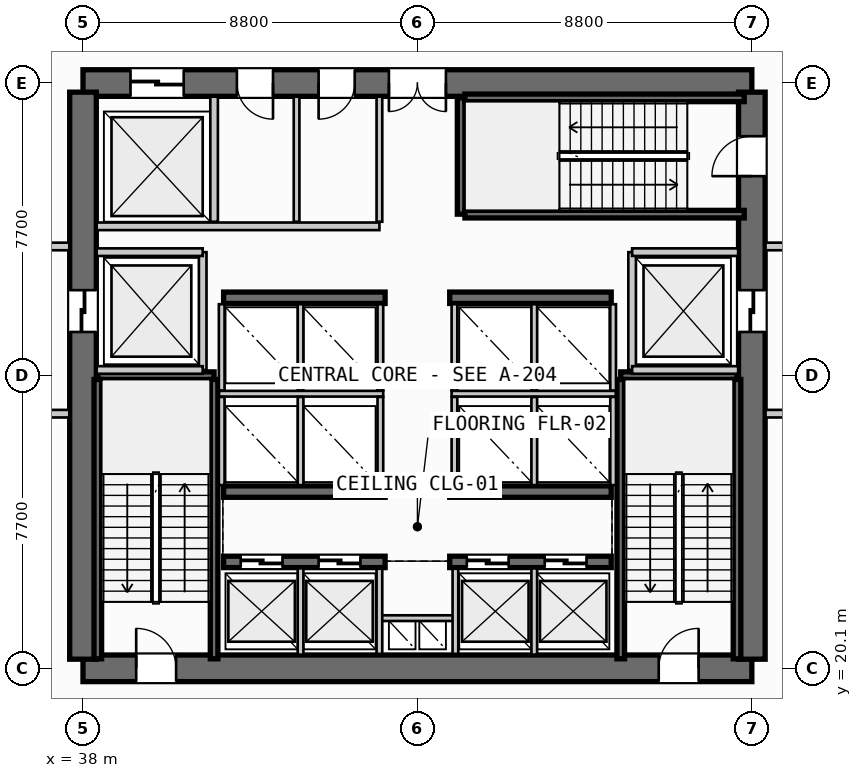
"""IFC4 building model, lengths in metres.
Left out: names, types, materials, properties, quantities, classifications, styles, units other than length and angle.
Written with IfcOpenShell. Run it as: python <this file> out.ifc"""

import sys

from ifc_helpers import new_model, si_unit, direction, frame, frame_2d, origin, place, context, subcontext, project, spatial, rectangle, extrude, source, transform, mapped, element, fill, save


model = new_model("IFC4")
c1 = context("Model", 3, precision=1e-05, world=origin(), true_north=direction((0.0, 1.0)))
c2 = subcontext(c1, "Body", "Model", "MODEL_VIEW")
j1 = project(units=[si_unit("LENGTHUNIT", "METRE"), si_unit("PLANEANGLEUNIT", "RADIAN")], contexts=[c1])
p1 = place(None, origin())
s1 = spatial("IfcSite", under=j1, at=p1, CompositionType="ELEMENT")
p2 = place(p1, origin())
s2 = spatial("IfcBuilding", under=s1, at=p2, CompositionType="ELEMENT")
p3 = place(p2, frame((0.0, 0.0, 19.6)))
s3 = spatial("IfcBuildingStorey", under=s2, at=p3, CompositionType="ELEMENT", Elevation=19.6)
p4 = place(p3, frame((38.0, 20.1, 0.0), z_axis=(0.0, 0.0, 1.0), x_axis=(1.0, 0.0, 0.0)))
e1 = element("IfcWall", 1, at=p4, inside=s3, PredefinedType="SHEAR", context=c2, shape_type="SweptSolid", body=[
    extrude(rectangle(XDim=17.6, YDim=0.7, at=frame_2d((8.8, 0.0))), origin(), (0.0, 0.0, 1.0), 4.08),
])
p5 = place(p4, frame((1.4, 0.0, 0.0)))
e2 = element("IfcOpeningElement", 2, at=p5, cuts=e1, PredefinedType="OPENING", context=c2, shape_type="SweptSolid", body=[
    extrude(rectangle(XDim=1.05, YDim=2.15, at=frame_2d((0.525, 1.075))), frame((0.0, 0.36, 0.0), z_axis=(0.0, -1.0, 0.0), x_axis=(1.0, 0.0, 0.0)), (0.0, 0.0, 1.0), 0.72),
])
p6 = place(p4, frame((15.15, 0.0, 0.0)))
e3 = element("IfcOpeningElement", 3, at=p6, cuts=e1, PredefinedType="OPENING", context=c2, shape_type="SweptSolid", body=[
    extrude(rectangle(XDim=1.05, YDim=2.15, at=frame_2d((0.525, 1.075))), frame((0.0, 0.36, 0.0), z_axis=(0.0, -1.0, 0.0), x_axis=(1.0, 0.0, 0.0)), (0.0, 0.0, 1.0), 0.72),
])
p7 = place(p3, frame((55.6, 35.5, 0.0), z_axis=(0.0, 0.0, 1.0), x_axis=(-1.0, 0.0, 0.0)))
e4 = element("IfcWall", 4, at=p7, inside=s3, PredefinedType="SHEAR", context=c2, shape_type="SweptSolid", body=[
    extrude(rectangle(XDim=17.6, YDim=0.7, at=frame_2d((8.8, 0.0))), origin(), (0.0, 0.0, 1.0), 4.08),
])
p8 = place(p7, frame((8.05, 0.0, 0.0)))
e5 = element("IfcOpeningElement", 5, at=p8, cuts=e4, PredefinedType="OPENING", context=c2, shape_type="SweptSolid", body=[
    extrude(rectangle(XDim=1.5, YDim=2.2, at=frame_2d((0.75, 1.1))), frame((0.0, 0.36, 0.0), z_axis=(0.0, -1.0, 0.0), x_axis=(1.0, 0.0, 0.0)), (0.0, 0.0, 1.0), 0.72),
])
p9 = place(p7, frame((14.95, 0.0, 0.0)))
e6 = element("IfcOpeningElement", 6, at=p9, cuts=e4, PredefinedType="OPENING", context=c2, shape_type="SweptSolid", body=[
    extrude(rectangle(XDim=1.4, YDim=2.3, at=frame_2d((0.7, 1.15))), frame((0.0, 0.36, 0.0), z_axis=(0.0, -1.0, 0.0), x_axis=(1.0, 0.0, 0.0)), (0.0, 0.0, 1.0), 0.72),
])
p10 = place(p7, frame((12.6, 0.0, 0.0)))
e7 = element("IfcOpeningElement", 7, at=p10, cuts=e4, PredefinedType="OPENING", context=c2, shape_type="SweptSolid", body=[
    extrude(rectangle(XDim=0.95, YDim=2.15, at=frame_2d((0.475, 1.075))), frame((0.0, 0.36, 0.0), z_axis=(0.0, -1.0, 0.0), x_axis=(1.0, 0.0, 0.0)), (0.0, 0.0, 1.0), 0.72),
])
p11 = place(p7, frame((10.45, 0.0, 0.0)))
e8 = element("IfcOpeningElement", 8, at=p11, cuts=e4, PredefinedType="OPENING", context=c2, shape_type="SweptSolid", body=[
    extrude(rectangle(XDim=0.95, YDim=2.15, at=frame_2d((0.475, 1.075))), frame((0.0, 0.36, 0.0), z_axis=(0.0, -1.0, 0.0), x_axis=(1.0, 0.0, 0.0)), (0.0, 0.0, 1.0), 0.72),
])
p12 = place(p3, frame((38.0, 35.26, 0.0), z_axis=(0.0, 0.0, 1.0), x_axis=(0.0, -1.0, 0.0)))
e9 = element("IfcWall", 9, at=p12, inside=s3, PredefinedType="SHEAR", context=c2, shape_type="SweptSolid", body=[
    extrude(rectangle(XDim=14.92, YDim=0.7, at=frame_2d((7.46, 0.0))), origin(), (0.0, 0.0, 1.0), 4.08),
])
p13 = place(p12, frame((5.21, 0.0, 0.0)))
e10 = element("IfcOpeningElement", 10, at=p13, cuts=e9, PredefinedType="OPENING", context=c2, shape_type="SweptSolid", body=[
    extrude(rectangle(XDim=1.1, YDim=2.2, at=frame_2d((0.55, 1.1))), frame((0.0, 0.36, 0.0), z_axis=(0.0, -1.0, 0.0), x_axis=(1.0, 0.0, 0.0)), (0.0, 0.0, 1.0), 0.72),
])
p14 = place(p3, frame((55.6, 20.34, 0.0), z_axis=(0.0, 0.0, 1.0), x_axis=(0.0, 1.0, 0.0)))
e11 = element("IfcWall", 11, at=p14, inside=s3, PredefinedType="SHEAR", context=c2, shape_type="SweptSolid", body=[
    extrude(rectangle(XDim=14.92, YDim=0.7, at=frame_2d((7.46, 0.0))), origin(), (0.0, 0.0, 1.0), 4.08),
])
p15 = place(p14, frame((12.71, 0.0, 0.0)))
e12 = element("IfcOpeningElement", 12, at=p15, cuts=e11, PredefinedType="OPENING", context=c2, shape_type="SweptSolid", body=[
    extrude(rectangle(XDim=1.05, YDim=2.15, at=frame_2d((0.525, 1.075))), frame((0.0, 0.36, 0.0), z_axis=(0.0, -1.0, 0.0), x_axis=(1.0, 0.0, 0.0)), (0.0, 0.0, 1.0), 0.72),
])
p16 = place(p14, frame((8.61, 0.0, 0.0)))
e13 = element("IfcOpeningElement", 13, at=p16, cuts=e11, PredefinedType="OPENING", context=c2, shape_type="SweptSolid", body=[
    extrude(rectangle(XDim=1.1, YDim=2.2, at=frame_2d((0.55, 1.1))), frame((0.0, 0.36, 0.0), z_axis=(0.0, -1.0, 0.0), x_axis=(1.0, 0.0, 0.0)), (0.0, 0.0, 1.0), 0.72),
])
p17 = place(p3, frame((41.7, 22.9, 0.0), z_axis=(0.0, 0.0, 1.0), x_axis=(1.0, 0.0, 0.0)))
e14 = element("IfcWall", 14, at=p17, inside=s3, PredefinedType="SHEAR", context=c2, shape_type="SweptSolid", body=[
    extrude(rectangle(XDim=4.25, YDim=0.3, at=frame_2d((2.125, 0.0))), origin(), (0.0, 0.0, 1.0), 4.08),
])
p18 = place(p17, frame((0.45, 0.0, 0.0)))
e15 = element("IfcOpeningElement", 15, at=p18, cuts=e14, PredefinedType="OPENING", context=c2, shape_type="SweptSolid", body=[
    extrude(rectangle(XDim=1.1, YDim=2.2, at=frame_2d((0.55, 1.1))), frame((0.0, 0.16, 0.0), z_axis=(0.0, -1.0, 0.0), x_axis=(1.0, 0.0, 0.0)), (0.0, 0.0, 1.0), 0.32),
])
p19 = place(p17, frame((2.5, 0.0, 0.0)))
e16 = element("IfcOpeningElement", 16, at=p19, cuts=e14, PredefinedType="OPENING", context=c2, shape_type="SweptSolid", body=[
    extrude(rectangle(XDim=1.1, YDim=2.2, at=frame_2d((0.55, 1.1))), frame((0.0, 0.16, 0.0), z_axis=(0.0, -1.0, 0.0), x_axis=(1.0, 0.0, 0.0)), (0.0, 0.0, 1.0), 0.32),
])
p20 = place(p3, frame((47.65, 22.9, 0.0), z_axis=(0.0, 0.0, 1.0), x_axis=(1.0, 0.0, 0.0)))
e17 = element("IfcWall", 17, at=p20, inside=s3, PredefinedType="SHEAR", context=c2, shape_type="SweptSolid", body=[
    extrude(rectangle(XDim=4.25, YDim=0.3, at=frame_2d((2.125, 0.0))), origin(), (0.0, 0.0, 1.0), 4.08),
])
p21 = place(p20, frame((0.45, 0.0, 0.0)))
e18 = element("IfcOpeningElement", 18, at=p21, cuts=e17, PredefinedType="OPENING", context=c2, shape_type="SweptSolid", body=[
    extrude(rectangle(XDim=1.1, YDim=2.2, at=frame_2d((0.55, 1.1))), frame((0.0, 0.16, 0.0), z_axis=(0.0, -1.0, 0.0), x_axis=(1.0, 0.0, 0.0)), (0.0, 0.0, 1.0), 0.32),
])
p22 = place(p20, frame((2.5, 0.0, 0.0)))
e19 = element("IfcOpeningElement", 19, at=p22, cuts=e17, PredefinedType="OPENING", context=c2, shape_type="SweptSolid", body=[
    extrude(rectangle(XDim=1.1, YDim=2.2, at=frame_2d((0.55, 1.1))), frame((0.0, 0.16, 0.0), z_axis=(0.0, -1.0, 0.0), x_axis=(1.0, 0.0, 0.0)), (0.0, 0.0, 1.0), 0.32),
])
for number, where, z_axis, x_axis in (
    (20, (41.7, 24.75, 0.0), (0.0, 0.0, 1.0), (1.0, 0.0, 0.0)),
    (21, (47.65, 24.75, 0.0), (0.0, 0.0, 1.0), (1.0, 0.0, 0.0)),
    (22, (41.7, 29.85, 0.0), (0.0, 0.0, 1.0), (1.0, 0.0, 0.0)),
    (23, (47.65, 29.85, 0.0), (0.0, 0.0, 1.0), (1.0, 0.0, 0.0)),
):
    element("IfcWall", number, at=place(p3, frame(where, z_axis=z_axis, x_axis=x_axis)), inside=s3, PredefinedType="SHEAR", context=c2, shape_type="SweptSolid", body=[
        extrude(rectangle(XDim=4.25, YDim=0.3, at=frame_2d((2.125, 0.0))), origin(), (0.0, 0.0, 1.0), 4.08),
    ])
p23 = place(p3, frame((38.39, 27.8, 0.0), z_axis=(0.0, 0.0, 1.0), x_axis=(1.0, 0.0, 0.0)))
e24 = element("IfcWall", 24, at=p23, inside=s3, PredefinedType="SHEAR", context=c2, shape_type="SweptSolid", body=[
    extrude(rectangle(XDim=3.06, YDim=0.2, at=frame_2d((1.53, 0.0))), origin(), (0.0, 0.0, 1.0), 4.08),
])
for number, where, z_axis, x_axis in (
    (25, (41.45, 27.7, 0.0), (0.0, 0.0, 1.0), (0.0, -1.0, 0.0)),
    (26, (38.39, 20.35, 0.0), (0.0, 0.0, 1.0), (0.0, 1.0, 0.0)),
):
    element("IfcWall", number, at=place(p3, frame(where, z_axis=z_axis, x_axis=x_axis)), inside=s3, PredefinedType="SHEAR", context=c2, shape_type="SweptSolid", body=[
        extrude(rectangle(XDim=7.35, YDim=0.2, at=frame_2d((3.675, 0.0))), origin(), (0.0, 0.0, 1.0), 4.08),
    ])
p24 = place(p3, frame((52.15, 27.8, 0.0), z_axis=(0.0, 0.0, 1.0), x_axis=(1.0, 0.0, 0.0)))
e27 = element("IfcWall", 27, at=p24, inside=s3, PredefinedType="SHEAR", context=c2, shape_type="SweptSolid", body=[
    extrude(rectangle(XDim=3.06, YDim=0.2, at=frame_2d((1.53, 0.0))), origin(), (0.0, 0.0, 1.0), 4.08),
])
for number, where, z_axis, x_axis in (
    (28, (55.21, 27.7, 0.0), (0.0, 0.0, 1.0), (0.0, -1.0, 0.0)),
    (29, (52.15, 20.35, 0.0), (0.0, 0.0, 1.0), (0.0, 1.0, 0.0)),
):
    element("IfcWall", number, at=place(p3, frame(where, z_axis=z_axis, x_axis=x_axis)), inside=s3, PredefinedType="SHEAR", context=c2, shape_type="SweptSolid", body=[
        extrude(rectangle(XDim=7.35, YDim=0.2, at=frame_2d((3.675, 0.0))), origin(), (0.0, 0.0, 1.0), 4.08),
    ])
p25 = place(p3, frame((47.95, 32.05, 0.0), z_axis=(0.0, 0.0, 1.0), x_axis=(0.0, 1.0, 0.0)))
e30 = element("IfcWall", 30, at=p25, inside=s3, PredefinedType="SHEAR", context=c2, shape_type="SweptSolid", body=[
    extrude(rectangle(XDim=3.06, YDim=0.2, at=frame_2d((1.53, 0.0))), origin(), (0.0, 0.0, 1.0), 4.08),
])
for number, where, z_axis, x_axis in (
    (31, (48.05, 35.11, 0.0), (0.0, 0.0, 1.0), (1.0, 0.0, 0.0)),
    (32, (55.4, 32.05, 0.0), (0.0, 0.0, 1.0), (-1.0, 0.0, 0.0)),
):
    element("IfcWall", number, at=place(p3, frame(where, z_axis=z_axis, x_axis=x_axis)), inside=s3, PredefinedType="SHEAR", context=c2, shape_type="SweptSolid", body=[
        extrude(rectangle(XDim=7.35, YDim=0.2, at=frame_2d((3.675, 0.0))), origin(), (0.0, 0.0, 1.0), 4.08),
    ])
p26 = place(p3, frame((45.8, 21.42, 0.0), z_axis=(0.0, 0.0, 1.0), x_axis=(1.0, 0.0, 0.0)))
e33 = element("IfcWall", 33, at=p26, inside=s3, PredefinedType="PARTITIONING", context=c2, shape_type="SweptSolid", body=[
    extrude(rectangle(XDim=2.0, YDim=0.15, at=frame_2d((1.0, 0.0))), origin(), (0.0, 0.0, 1.0), 3.293),
])
for number, where, z_axis, x_axis in (
    (34, (45.8, 20.48, 0.0), (0.0, 0.0, 1.0), (0.0, 1.0, 0.0)),
    (35, (47.8, 20.48, 0.0), (0.0, 0.0, 1.0), (0.0, 1.0, 0.0)),
):
    element("IfcWall", number, at=place(p3, frame(where, z_axis=z_axis, x_axis=x_axis)), inside=s3, PredefinedType="PARTITIONING", context=c2, shape_type="SweptSolid", body=[
        extrude(rectangle(XDim=2.24, YDim=0.15, at=frame_2d((1.12, 0.0))), origin(), (0.0, 0.0, 1.0), 3.293),
    ])
p27 = place(p3, frame((41.15, 27.95, 0.0), z_axis=(0.0, 0.0, 1.0), x_axis=(0.0, 1.0, 0.0)))
e36 = element("IfcWall", 36, at=p27, inside=s3, PredefinedType="PARTITIONING", context=c2, shape_type="SweptSolid", body=[
    extrude(rectangle(XDim=3.1, YDim=0.2, at=frame_2d((1.55, 0.0))), origin(), (0.0, 0.0, 1.0), 3.293),
])
for number, where, z_axis, x_axis in (
    (37, (38.36, 27.95, 0.0), (0.0, 0.0, 1.0), (1.0, 0.0, 0.0)),
    (38, (38.36, 31.05, 0.0), (0.0, 0.0, 1.0), (1.0, 0.0, 0.0)),
):
    element("IfcWall", number, at=place(p3, frame(where, z_axis=z_axis, x_axis=x_axis)), inside=s3, PredefinedType="PARTITIONING", context=c2, shape_type="SweptSolid", body=[
        extrude(rectangle(XDim=2.79, YDim=0.2, at=frame_2d((1.395, 0.0))), origin(), (0.0, 0.0, 1.0), 3.293),
    ])
for number, where, z_axis, x_axis in (
    (39, (34.5, 26.8, 0.0), (0.0, 0.0, 1.0), (1.0, 0.0, 0.0)),
    (40, (34.5, 31.2, 0.0), (0.0, 0.0, 1.0), (1.0, 0.0, 0.0)),
):
    element("IfcWall", number, at=place(p3, frame(where, z_axis=z_axis, x_axis=x_axis)), inside=s3, PredefinedType="PARTITIONING", context=c2, shape_type="SweptSolid", body=[
        extrude(rectangle(XDim=3.14, YDim=0.2, at=frame_2d((1.57, 0.0))), origin(), (0.0, 0.0, 1.0), 3.293),
    ])
p28 = place(p3, frame((52.45, 27.95, 0.0), z_axis=(0.0, 0.0, 1.0), x_axis=(0.0, 1.0, 0.0)))
e41 = element("IfcWall", 41, at=p28, inside=s3, PredefinedType="PARTITIONING", context=c2, shape_type="SweptSolid", body=[
    extrude(rectangle(XDim=3.1, YDim=0.2, at=frame_2d((1.55, 0.0))), origin(), (0.0, 0.0, 1.0), 3.293),
])
for number, where, z_axis, x_axis in (
    (42, (52.45, 27.95, 0.0), (0.0, 0.0, 1.0), (1.0, 0.0, 0.0)),
    (43, (52.45, 31.05, 0.0), (0.0, 0.0, 1.0), (1.0, 0.0, 0.0)),
):
    element("IfcWall", number, at=place(p3, frame(where, z_axis=z_axis, x_axis=x_axis)), inside=s3, PredefinedType="PARTITIONING", context=c2, shape_type="SweptSolid", body=[
        extrude(rectangle(XDim=2.79, YDim=0.2, at=frame_2d((1.395, 0.0))), origin(), (0.0, 0.0, 1.0), 3.293),
    ])
for number, where, z_axis, x_axis in (
    (44, (55.96, 26.8, 0.0), (0.0, 0.0, 1.0), (1.0, 0.0, 0.0)),
    (45, (55.96, 31.2, 0.0), (0.0, 0.0, 1.0), (1.0, 0.0, 0.0)),
):
    element("IfcWall", number, at=place(p3, frame(where, z_axis=z_axis, x_axis=x_axis)), inside=s3, PredefinedType="PARTITIONING", context=c2, shape_type="SweptSolid", body=[
        extrude(rectangle(XDim=3.14, YDim=0.2, at=frame_2d((1.57, 0.0))), origin(), (0.0, 0.0, 1.0), 3.293),
    ])
for number, where, z_axis, x_axis in (
    (46, (43.725, 20.46, 0.0), (0.0, 0.0, 1.0), (0.0, 1.0, 0.0)),
    (47, (49.875, 20.46, 0.0), (0.0, 0.0, 1.0), (0.0, 1.0, 0.0)),
):
    element("IfcWall", number, at=place(p3, frame(where, z_axis=z_axis, x_axis=x_axis)), inside=s3, PredefinedType="PARTITIONING", context=c2, shape_type="SweptSolid", body=[
        extrude(rectangle(XDim=2.27, YDim=0.15, at=frame_2d((1.135, 0.0))), origin(), (0.0, 0.0, 1.0), 3.293),
    ])
p29 = place(p3, frame((41.58, 27.325, 0.0), z_axis=(0.0, 0.0, 1.0), x_axis=(1.0, 0.0, 0.0)))
e48 = element("IfcWall", 48, at=p29, inside=s3, PredefinedType="PARTITIONING", context=c2, shape_type="SweptSolid", body=[
    extrude(rectangle(XDim=4.32, YDim=0.15, at=frame_2d((2.16, 0.0))), origin(), (0.0, 0.0, 1.0), 3.293),
])
p30 = place(p3, frame((47.7, 27.325, 0.0), z_axis=(0.0, 0.0, 1.0), x_axis=(1.0, 0.0, 0.0)))
e49 = element("IfcWall", 49, at=p30, inside=s3, PredefinedType="PARTITIONING", context=c2, shape_type="SweptSolid", body=[
    extrude(rectangle(XDim=4.32, YDim=0.15, at=frame_2d((2.16, 0.0))), origin(), (0.0, 0.0, 1.0), 3.293),
])
for number, where, z_axis, x_axis in (
    (50, (41.65, 24.92, 0.0), (0.0, 0.0, 1.0), (0.0, 1.0, 0.0)),
    (51, (43.725, 24.92, 0.0), (0.0, 0.0, 1.0), (0.0, 1.0, 0.0)),
    (52, (45.825, 24.92, 0.0), (0.0, 0.0, 1.0), (0.0, 1.0, 0.0)),
    (53, (47.775, 24.92, 0.0), (0.0, 0.0, 1.0), (0.0, 1.0, 0.0)),
    (54, (49.875, 24.92, 0.0), (0.0, 0.0, 1.0), (0.0, 1.0, 0.0)),
    (55, (51.95, 24.92, 0.0), (0.0, 0.0, 1.0), (0.0, 1.0, 0.0)),
):
    element("IfcWall", number, at=place(p3, frame(where, z_axis=z_axis, x_axis=x_axis)), inside=s3, PredefinedType="PARTITIONING", context=c2, shape_type="SweptSolid", body=[
        extrude(rectangle(XDim=2.32, YDim=0.15, at=frame_2d((1.16, 0.0))), origin(), (0.0, 0.0, 1.0), 3.293),
    ])
for number, where, z_axis, x_axis in (
    (56, (41.65, 27.41, 0.0), (0.0, 0.0, 1.0), (0.0, 1.0, 0.0)),
    (57, (43.725, 27.41, 0.0), (0.0, 0.0, 1.0), (0.0, 1.0, 0.0)),
    (58, (45.825, 27.41, 0.0), (0.0, 0.0, 1.0), (0.0, 1.0, 0.0)),
    (59, (47.775, 27.41, 0.0), (0.0, 0.0, 1.0), (0.0, 1.0, 0.0)),
    (60, (49.875, 27.41, 0.0), (0.0, 0.0, 1.0), (0.0, 1.0, 0.0)),
    (61, (51.95, 27.41, 0.0), (0.0, 0.0, 1.0), (0.0, 1.0, 0.0)),
):
    element("IfcWall", number, at=place(p3, frame(where, z_axis=z_axis, x_axis=x_axis)), inside=s3, PredefinedType="PARTITIONING", context=c2, shape_type="SweptSolid", body=[
        extrude(rectangle(XDim=2.27, YDim=0.15, at=frame_2d((1.135, 0.0))), origin(), (0.0, 0.0, 1.0), 3.293),
    ])
p31 = place(p3, frame((41.45, 31.85, 0.0), z_axis=(0.0, 0.0, 1.0), x_axis=(0.0, 1.0, 0.0)))
e62 = element("IfcWall", 62, at=p31, inside=s3, PredefinedType="PARTITIONING", context=c2, shape_type="SweptSolid", body=[
    extrude(rectangle(XDim=3.29, YDim=0.2, at=frame_2d((1.645, 0.0))), origin(), (0.0, 0.0, 1.0), 3.293),
])
p32 = place(p3, frame((38.36, 31.73, 0.0), z_axis=(0.0, 0.0, 1.0), x_axis=(1.0, 0.0, 0.0)))
e63 = element("IfcWall", 63, at=p32, inside=s3, PredefinedType="PARTITIONING", context=c2, shape_type="SweptSolid", body=[
    extrude(rectangle(XDim=7.44, YDim=0.2, at=frame_2d((3.72, 0.0))), origin(), (0.0, 0.0, 1.0), 3.293),
])
p33 = place(p3, frame((45.8, 31.85, 0.0), z_axis=(0.0, 0.0, 1.0), x_axis=(0.0, 1.0, 0.0)))
e64 = element("IfcWall", 64, at=p33, inside=s3, PredefinedType="PARTITIONING", context=c2, shape_type="SweptSolid", body=[
    extrude(rectangle(XDim=3.29, YDim=0.15, at=frame_2d((1.645, 0.0))), origin(), (0.0, 0.0, 1.0), 3.293),
])
p34 = place(p3, frame((43.62, 31.85, 0.0), z_axis=(0.0, 0.0, 1.0), x_axis=(0.0, 1.0, 0.0)))
e65 = element("IfcWall", 65, at=p34, inside=s3, PredefinedType="PLUMBINGWALL", context=c2, shape_type="SweptSolid", body=[
    extrude(rectangle(XDim=3.29, YDim=0.15, at=frame_2d((1.645, 0.0))), origin(), (0.0, 0.0, 1.0), 3.293),
])
m1 = source(origin(), c2, "Body", "SweptSolid", [
    extrude(rectangle(XDim=1.05, YDim=2.15, at=frame_2d((0.525, 1.075))), frame((0.0, 0.025, 0.0), z_axis=(0.0, -1.0, 0.0), x_axis=(1.0, 0.0, 0.0)), (0.0, 0.0, 1.0), 0.05),
])
p35 = place(p5, origin())
e66 = element("IfcDoor", 66, at=p35, inside=s3, OperationType="SINGLE_SWING_LEFT", PredefinedType="DOOR", context=c2, shape_type="MappedRepresentation", body=[
    mapped(m1, transform((0.0, 0.0, 0.0), scale=1.0)),
])
fill(e2, e66)
p36 = place(p6, origin())
e67 = element("IfcDoor", 67, at=p36, inside=s3, OperationType="SINGLE_SWING_RIGHT", PredefinedType="DOOR", context=c2, shape_type="MappedRepresentation", body=[
    mapped(m1, transform((0.0, 0.0, 0.0), scale=1.0)),
])
fill(e3, e67)
p37 = place(p15, origin())
e68 = element("IfcDoor", 68, at=p37, inside=s3, OperationType="SINGLE_SWING_LEFT", PredefinedType="DOOR", context=c2, shape_type="MappedRepresentation", body=[
    mapped(m1, transform((0.0, 0.0, 0.0), scale=1.0)),
])
fill(e12, e68)
m2 = source(origin(), c2, "Body", "SweptSolid", [
    extrude(rectangle(XDim=1.5, YDim=2.2, at=frame_2d((0.75, 1.1))), frame((0.0, 0.025, 0.0), z_axis=(0.0, -1.0, 0.0), x_axis=(1.0, 0.0, 0.0)), (0.0, 0.0, 1.0), 0.05),
])
p38 = place(p8, origin())
e69 = element("IfcDoor", 69, at=p38, inside=s3, OperationType="DOUBLE_DOOR_SINGLE_SWING", PredefinedType="DOOR", context=c2, shape_type="MappedRepresentation", body=[
    mapped(m2, transform((0.0, 0.0, 0.0), scale=1.0)),
])
fill(e5, e69)
m3 = source(origin(), c2, "Body", "SweptSolid", [
    extrude(rectangle(XDim=1.1, YDim=2.2, at=frame_2d((0.55, 1.1))), frame((0.0, 0.025, 0.0), z_axis=(0.0, -1.0, 0.0), x_axis=(1.0, 0.0, 0.0)), (0.0, 0.0, 1.0), 0.05),
])
p39 = place(p13, origin())
e70 = element("IfcDoor", 70, at=p39, inside=s3, OperationType="SLIDING_TO_LEFT", PredefinedType="DOOR", context=c2, shape_type="MappedRepresentation", body=[
    mapped(m3, transform((0.0, 0.0, 0.0), scale=1.0)),
])
fill(e10, e70)
p40 = place(p16, origin())
e71 = element("IfcDoor", 71, at=p40, inside=s3, OperationType="SLIDING_TO_RIGHT", PredefinedType="DOOR", context=c2, shape_type="MappedRepresentation", body=[
    mapped(m3, transform((0.0, 0.0, 0.0), scale=1.0)),
])
fill(e13, e71)
p41 = place(p18, origin())
e72 = element("IfcDoor", 72, at=p41, inside=s3, OperationType="SLIDING_TO_LEFT", PredefinedType="DOOR", context=c2, shape_type="MappedRepresentation", body=[
    mapped(m3, transform((0.0, 0.0, 0.0), scale=1.0)),
])
fill(e15, e72)
p42 = place(p19, origin())
e73 = element("IfcDoor", 73, at=p42, inside=s3, OperationType="SLIDING_TO_LEFT", PredefinedType="DOOR", context=c2, shape_type="MappedRepresentation", body=[
    mapped(m3, transform((0.0, 0.0, 0.0), scale=1.0)),
])
fill(e16, e73)
p43 = place(p21, origin())
e74 = element("IfcDoor", 74, at=p43, inside=s3, OperationType="SLIDING_TO_LEFT", PredefinedType="DOOR", context=c2, shape_type="MappedRepresentation", body=[
    mapped(m3, transform((0.0, 0.0, 0.0), scale=1.0)),
])
fill(e18, e74)
p44 = place(p22, origin())
e75 = element("IfcDoor", 75, at=p44, inside=s3, OperationType="SLIDING_TO_LEFT", PredefinedType="DOOR", context=c2, shape_type="MappedRepresentation", body=[
    mapped(m3, transform((0.0, 0.0, 0.0), scale=1.0)),
])
fill(e19, e75)
m4 = source(origin(), c2, "Body", "SweptSolid", [
    extrude(rectangle(XDim=1.4, YDim=2.3, at=frame_2d((0.7, 1.15))), frame((0.0, 0.025, 0.0), z_axis=(0.0, -1.0, 0.0), x_axis=(1.0, 0.0, 0.0)), (0.0, 0.0, 1.0), 0.05),
])
p45 = place(p9, origin())
e76 = element("IfcDoor", 76, at=p45, inside=s3, OperationType="SLIDING_TO_RIGHT", PredefinedType="DOOR", context=c2, shape_type="MappedRepresentation", body=[
    mapped(m4, transform((0.0, 0.0, 0.0), scale=1.0)),
])
fill(e6, e76)
m5 = source(origin(), c2, "Body", "SweptSolid", [
    extrude(rectangle(XDim=0.95, YDim=2.15, at=frame_2d((0.475, 1.075))), frame((0.0, 0.025, 0.0), z_axis=(0.0, -1.0, 0.0), x_axis=(1.0, 0.0, 0.0)), (0.0, 0.0, 1.0), 0.05),
])
p46 = place(p10, origin())
e77 = element("IfcDoor", 77, at=p46, inside=s3, OperationType="SINGLE_SWING_LEFT", PredefinedType="DOOR", context=c2, shape_type="MappedRepresentation", body=[
    mapped(m5, transform((0.0, 0.0, 0.0), scale=1.0)),
])
fill(e7, e77)
p47 = place(p11, origin())
e78 = element("IfcDoor", 78, at=p47, inside=s3, OperationType="SINGLE_SWING_RIGHT", PredefinedType="DOOR", context=c2, shape_type="MappedRepresentation", body=[
    mapped(m5, transform((0.0, 0.0, 0.0), scale=1.0)),
])
fill(e8, e78)
save(model, sys.argv[1])
